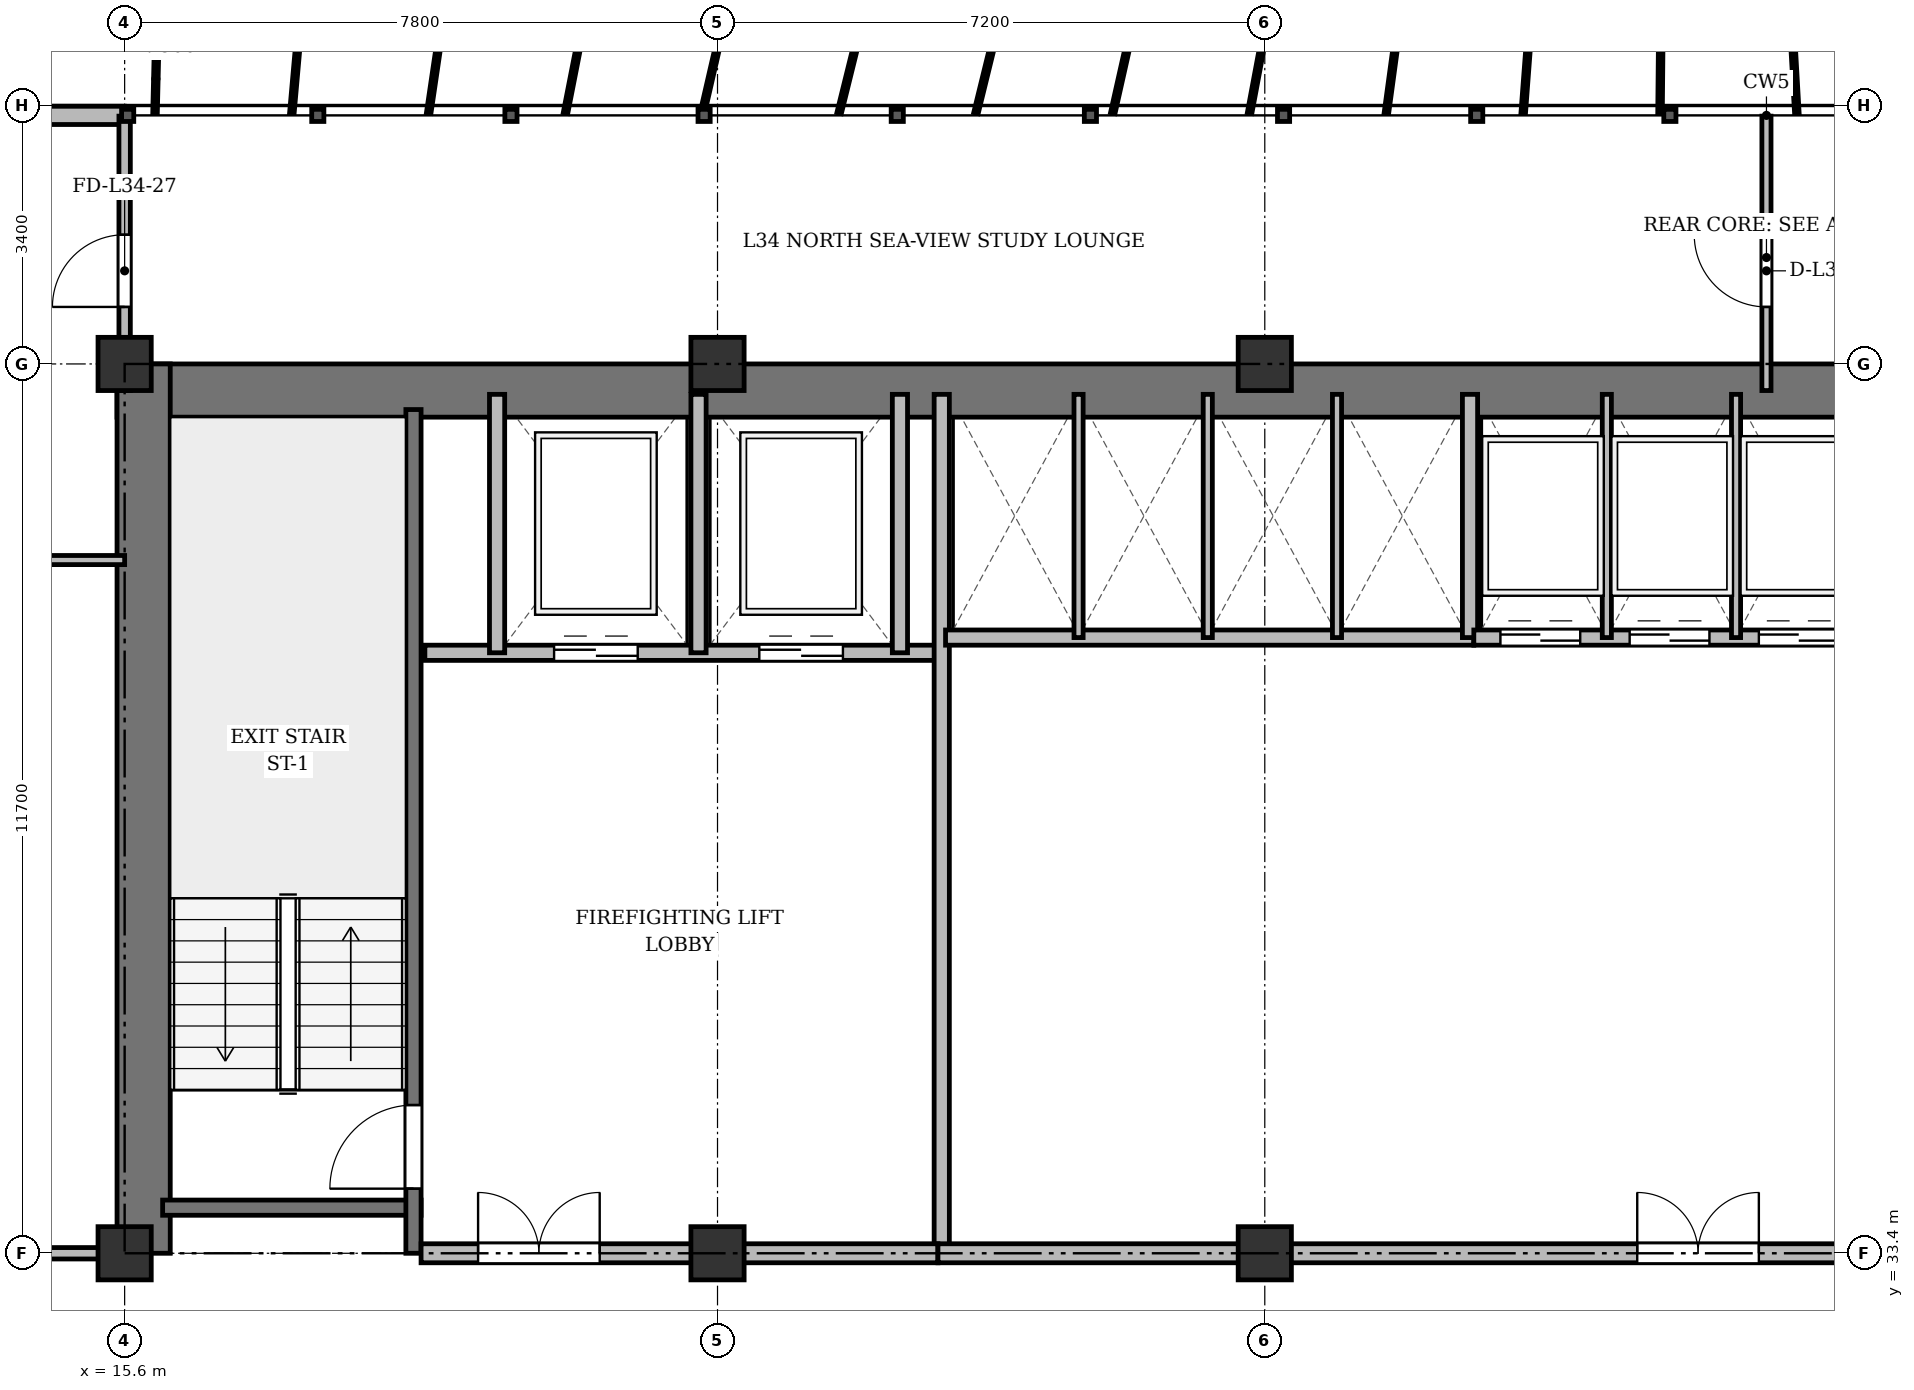
"""IFC4 building model, lengths in metres.
Left out: names, types, materials, properties, quantities, classifications, styles, units other than length and angle.
Written with IfcOpenShell. Run it as: python <this file> out.ifc"""

import sys

from ifc_helpers import new_model, si_unit, direction, frame, frame_2d, origin, origin_2d, place, context, subcontext, project, spatial, rectangle, extrude, source, transform, mapped, element, fill, save


model = new_model("IFC4")
c1 = context("Model", 3, precision=1e-05, world=origin(), true_north=direction((0.0, 1.0)))
c2 = subcontext(c1, "Body", "Model", "MODEL_VIEW")
j1 = project(units=[si_unit("LENGTHUNIT", "METRE"), si_unit("PLANEANGLEUNIT", "RADIAN")], contexts=[c1])
p1 = place(None, origin())
s1 = spatial("IfcSite", under=j1, at=p1, CompositionType="ELEMENT")
p2 = place(p1, origin())
s2 = spatial("IfcBuilding", under=s1, at=p2, CompositionType="ELEMENT")
p3 = place(p2, frame((0.0, 0.0, 132.1)))
s3 = spatial("IfcBuildingStorey", under=s2, at=p3, CompositionType="ELEMENT", Elevation=132.1)
m1 = source(origin(), c2, "Body", "SweptSolid", [
    extrude(rectangle(XDim=0.7, YDim=0.7, at=origin_2d()), origin(), (0.0, 0.0, 1.0), 3.6),
])
for number, where, z_axis, x_axis in (
    (1, (15.6, 33.4, 0.0), (0.0, 0.0, 1.0), (1.0, 0.0, 0.0)),
    (2, (15.6, 45.1, 0.0), (0.0, 0.0, 1.0), (1.0, 0.0, 0.0)),
    (3, (23.4, 33.4, 0.0), (0.0, 0.0, 1.0), (1.0, 0.0, 0.0)),
    (4, (23.4, 45.1, 0.0), (0.0, 0.0, 1.0), (1.0, 0.0, 0.0)),
    (5, (30.6, 33.4, 0.0), (0.0, 0.0, 1.0), (1.0, 0.0, 0.0)),
    (6, (30.6, 45.1, 0.0), (0.0, 0.0, 1.0), (1.0, 0.0, 0.0)),
):
    element("IfcColumn", number, at=place(p3, frame(where, z_axis=z_axis, x_axis=x_axis)), inside=s3, PredefinedType="COLUMN", context=c2, shape_type="MappedRepresentation", body=[
        mapped(m1, transform((0.0, 0.0, 0.0), x_axis=(1.0, 0.0, 0.0), y_axis=(0.0, 1.0, 0.0), z_axis=(0.0, 0.0, 1.0), scale=1.0)),
    ])
p4 = place(p3, frame((10.9, 48.37, 0.0), z_axis=(0.0, 0.0, 1.0), x_axis=(1.0, 0.0, 0.0)))
e7 = element("IfcWall", 7, at=p4, inside=s3, PredefinedType="SOLIDWALL", context=c2, shape_type="SweptSolid", body=[
    extrude(rectangle(XDim=4.7, YDim=0.24, at=frame_2d((2.35, 0.0))), origin(), (0.0, 0.0, 1.0), 3.35),
])
p5 = place(p4, frame((2.132, 0.0, 0.9)))
e8 = element("IfcOpeningElement", 8, at=p5, cuts=e7, PredefinedType="OPENING", context=c2, shape_type="SweptSolid", body=[
    extrude(rectangle(XDim=1.2, YDim=1.65, at=frame_2d((0.6, 0.825))), frame((0.0, 0.13, 0.0), z_axis=(0.0, -1.0, 0.0), x_axis=(1.0, 0.0, 0.0)), (0.0, 0.0, 1.0), 0.26),
])
p6 = place(p3, frame((15.5, 44.75, 0.0), z_axis=(0.0, 0.0, 1.0), x_axis=(1.0, 0.0, 0.0)))
e9 = element("IfcWall", 9, at=p6, inside=s3, PredefinedType="SHEAR", context=c2, shape_type="SweptSolid", body=[
    extrude(rectangle(XDim=43.4, YDim=0.7, at=frame_2d((21.7, 0.0))), origin(), (0.0, 0.0, 1.0), 3.35),
])
p7 = place(p3, frame((15.85, 33.4, 0.0), z_axis=(0.0, 0.0, 1.0), x_axis=(0.0, 1.0, 0.0)))
e10 = element("IfcWall", 10, at=p7, inside=s3, PredefinedType="SHEAR", context=c2, shape_type="SweptSolid", body=[
    extrude(rectangle(XDim=11.7, YDim=0.7, at=frame_2d((5.85, 0.0))), origin(), (0.0, 0.0, 1.0), 3.35),
])
p8 = place(p3, frame((16.1, 34.0, 0.0), z_axis=(0.0, 0.0, 1.0), x_axis=(1.0, 0.0, 0.0)))
e11 = element("IfcWall", 11, at=p8, inside=s3, PredefinedType="SHEAR", context=c2, shape_type="SweptSolid", body=[
    extrude(rectangle(XDim=3.4, YDim=0.2, at=frame_2d((1.7, 0.0))), origin(), (0.0, 0.0, 1.0), 3.35),
])
p9 = place(p3, frame((19.4, 33.4, 0.0), z_axis=(0.0, 0.0, 1.0), x_axis=(0.0, 1.0, 0.0)))
e12 = element("IfcWall", 12, at=p9, inside=s3, PredefinedType="SHEAR", context=c2, shape_type="SweptSolid", body=[
    extrude(rectangle(XDim=11.1, YDim=0.2, at=frame_2d((5.55, 0.0))), origin(), (0.0, 0.0, 1.0), 3.35),
])
p10 = place(p9, frame((0.85, 0.0, 0.0)))
e13 = element("IfcOpeningElement", 13, at=p10, cuts=e12, PredefinedType="OPENING", context=c2, shape_type="SweptSolid", body=[
    extrude(rectangle(XDim=1.1, YDim=2.15, at=frame_2d((0.55, 1.075))), frame((0.0, 0.11, 0.0), z_axis=(0.0, -1.0, 0.0), x_axis=(1.0, 0.0, 0.0)), (0.0, 0.0, 1.0), 0.22),
])
p11 = place(p3, frame((19.55, 41.3, 0.0), z_axis=(0.0, 0.0, 1.0), x_axis=(1.0, 0.0, 0.0)))
e14 = element("IfcWall", 14, at=p11, inside=s3, PredefinedType="SOLIDWALL", context=c2, shape_type="SweptSolid", body=[
    extrude(rectangle(XDim=6.75, YDim=0.2, at=frame_2d((3.375, 0.0))), origin(), (0.0, 0.0, 1.0), 3.35),
])
p12 = place(p11, frame((1.7, 0.0, 0.0)))
e15 = element("IfcOpeningElement", 15, at=p12, cuts=e14, PredefinedType="OPENING", context=c2, shape_type="SweptSolid", body=[
    extrude(rectangle(XDim=1.1, YDim=2.15, at=frame_2d((0.55, 1.075))), frame((0.0, 0.11, 0.0), z_axis=(0.0, -1.0, 0.0), x_axis=(1.0, 0.0, 0.0)), (0.0, 0.0, 1.0), 0.22),
])
p13 = place(p11, frame((4.4, 0.0, 0.0)))
e16 = element("IfcOpeningElement", 16, at=p13, cuts=e14, PredefinedType="OPENING", context=c2, shape_type="SweptSolid", body=[
    extrude(rectangle(XDim=1.1, YDim=2.15, at=frame_2d((0.55, 1.075))), frame((0.0, 0.11, 0.0), z_axis=(0.0, -1.0, 0.0), x_axis=(1.0, 0.0, 0.0)), (0.0, 0.0, 1.0), 0.22),
])
for number, where, z_axis, x_axis in (
    (17, (20.5, 41.3, 0.0), (0.0, 0.0, 1.0), (0.0, 1.0, 0.0)),
    (18, (23.15, 41.3, 0.0), (0.0, 0.0, 1.0), (0.0, 1.0, 0.0)),
    (19, (25.8, 41.3, 0.0), (0.0, 0.0, 1.0), (0.0, 1.0, 0.0)),
):
    element("IfcWall", number, at=place(p3, frame(where, z_axis=z_axis, x_axis=x_axis)), inside=s3, PredefinedType="SOLIDWALL", context=c2, shape_type="SweptSolid", body=[
        extrude(rectangle(XDim=3.4, YDim=0.2, at=frame_2d((1.7, 0.0))), origin(), (0.0, 0.0, 1.0), 3.35),
    ])
p14 = place(p3, frame((26.35, 33.4, 0.0), z_axis=(0.0, 0.0, 1.0), x_axis=(0.0, 1.0, 0.0)))
e20 = element("IfcWall", 20, at=p14, inside=s3, PredefinedType="SOLIDWALL", context=c2, shape_type="SweptSolid", body=[
    extrude(rectangle(XDim=11.3, YDim=0.2, at=frame_2d((5.65, 0.0))), origin(), (0.0, 0.0, 1.0), 2.75),
])
p15 = place(p3, frame((19.5, 33.4, 0.0), z_axis=(0.0, 0.0, 1.0), x_axis=(1.0, 0.0, 0.0)))
e21 = element("IfcWall", 21, at=p15, inside=s3, PredefinedType="PARTITIONING", context=c2, shape_type="SweptSolid", body=[
    extrude(rectangle(XDim=6.8, YDim=0.25, at=frame_2d((3.4, 0.0))), origin(), (0.0, 0.0, 1.0), 2.75),
])
p16 = place(p15, frame((0.75, 0.0, 0.0)))
e22 = element("IfcOpeningElement", 22, at=p16, cuts=e21, PredefinedType="OPENING", context=c2, shape_type="SweptSolid", body=[
    extrude(rectangle(XDim=1.6, YDim=2.2, at=frame_2d((0.8, 1.1))), frame((0.0, 0.135, 0.0), z_axis=(0.0, -1.0, 0.0), x_axis=(1.0, 0.0, 0.0)), (0.0, 0.0, 1.0), 0.27),
])
p17 = place(p3, frame((26.4, 41.5, 0.0), z_axis=(0.0, 0.0, 1.0), x_axis=(1.0, 0.0, 0.0)))
e23 = element("IfcWall", 23, at=p17, inside=s3, PredefinedType="SOLIDWALL", context=c2, shape_type="SweptSolid", body=[
    extrude(rectangle(XDim=6.95, YDim=0.2, at=frame_2d((3.475, 0.0))), origin(), (0.0, 0.0, 1.0), 2.85),
])
p18 = place(p3, frame((33.3, 41.5, 0.0), z_axis=(0.0, 0.0, 1.0), x_axis=(0.0, 1.0, 0.0)))
e24 = element("IfcWall", 24, at=p18, inside=s3, PredefinedType="SOLIDWALL", context=c2, shape_type="SweptSolid", body=[
    extrude(rectangle(XDim=3.2, YDim=0.2, at=frame_2d((1.6, 0.0))), origin(), (0.0, 0.0, 1.0), 3.35),
])
for number, where, z_axis, x_axis in (
    (25, (28.15, 41.5, 0.0), (0.0, 0.0, 1.0), (0.0, 1.0, 0.0)),
    (26, (29.85, 41.5, 0.0), (0.0, 0.0, 1.0), (0.0, 1.0, 0.0)),
    (27, (31.55, 41.5, 0.0), (0.0, 0.0, 1.0), (0.0, 1.0, 0.0)),
):
    element("IfcWall", number, at=place(p3, frame(where, z_axis=z_axis, x_axis=x_axis)), inside=s3, PredefinedType="PARTITIONING", context=c2, shape_type="SweptSolid", body=[
        extrude(rectangle(XDim=3.2, YDim=0.12, at=frame_2d((1.6, 0.0))), origin(), (0.0, 0.0, 1.0), 3.35),
    ])
p19 = place(p3, frame((33.35, 41.5, 0.0), z_axis=(0.0, 0.0, 1.0), x_axis=(1.0, 0.0, 0.0)))
e28 = element("IfcWall", 28, at=p19, inside=s3, PredefinedType="SOLIDWALL", context=c2, shape_type="SweptSolid", body=[
    extrude(rectangle(XDim=6.9, YDim=0.2, at=frame_2d((3.45, 0.0))), origin(), (0.0, 0.0, 1.0), 3.35),
])
p20 = place(p19, frame((0.35, 0.0, 0.0)))
e29 = element("IfcOpeningElement", 29, at=p20, cuts=e28, PredefinedType="OPENING", context=c2, shape_type="SweptSolid", body=[
    extrude(rectangle(XDim=1.05, YDim=2.15, at=frame_2d((0.525, 1.075))), frame((0.0, 0.11, 0.0), z_axis=(0.0, -1.0, 0.0), x_axis=(1.0, 0.0, 0.0)), (0.0, 0.0, 1.0), 0.22),
])
p21 = place(p19, frame((2.05, 0.0, 0.0)))
e30 = element("IfcOpeningElement", 30, at=p21, cuts=e28, PredefinedType="OPENING", context=c2, shape_type="SweptSolid", body=[
    extrude(rectangle(XDim=1.05, YDim=2.15, at=frame_2d((0.525, 1.075))), frame((0.0, 0.11, 0.0), z_axis=(0.0, -1.0, 0.0), x_axis=(1.0, 0.0, 0.0)), (0.0, 0.0, 1.0), 0.22),
])
p22 = place(p19, frame((3.75, 0.0, 0.0)))
e31 = element("IfcOpeningElement", 31, at=p22, cuts=e28, PredefinedType="OPENING", context=c2, shape_type="SweptSolid", body=[
    extrude(rectangle(XDim=1.05, YDim=2.15, at=frame_2d((0.525, 1.075))), frame((0.0, 0.11, 0.0), z_axis=(0.0, -1.0, 0.0), x_axis=(1.0, 0.0, 0.0)), (0.0, 0.0, 1.0), 0.22),
])
p23 = place(p19, frame((5.45, 0.0, 0.0)))
e32 = element("IfcOpeningElement", 32, at=p23, cuts=e28, PredefinedType="OPENING", context=c2, shape_type="SweptSolid", body=[
    extrude(rectangle(XDim=1.05, YDim=2.15, at=frame_2d((0.525, 1.075))), frame((0.0, 0.11, 0.0), z_axis=(0.0, -1.0, 0.0), x_axis=(1.0, 0.0, 0.0)), (0.0, 0.0, 1.0), 0.22),
])
for number, where, z_axis, x_axis in (
    (33, (35.1, 41.5, 0.0), (0.0, 0.0, 1.0), (0.0, 1.0, 0.0)),
    (34, (36.8, 41.5, 0.0), (0.0, 0.0, 1.0), (0.0, 1.0, 0.0)),
):
    element("IfcWall", number, at=place(p3, frame(where, z_axis=z_axis, x_axis=x_axis)), inside=s3, PredefinedType="PARTITIONING", context=c2, shape_type="SweptSolid", body=[
        extrude(rectangle(XDim=3.2, YDim=0.12, at=frame_2d((1.6, 0.0))), origin(), (0.0, 0.0, 1.0), 3.35),
    ])
p24 = place(p3, frame((26.3, 33.4, 0.0), z_axis=(0.0, 0.0, 1.0), x_axis=(1.0, 0.0, 0.0)))
e35 = element("IfcWall", 35, at=p24, inside=s3, PredefinedType="PARTITIONING", context=c2, shape_type="SweptSolid", body=[
    extrude(rectangle(XDim=20.85, YDim=0.25, at=frame_2d((10.425, 0.0))), origin(), (0.0, 0.0, 1.0), 2.75),
])
p25 = place(p24, frame((9.2, 0.0, 0.0)))
e36 = element("IfcOpeningElement", 36, at=p25, cuts=e35, PredefinedType="OPENING", context=c2, shape_type="SweptSolid", body=[
    extrude(rectangle(XDim=1.6, YDim=2.2, at=frame_2d((0.8, 1.1))), frame((0.0, 0.135, 0.0), z_axis=(0.0, -1.0, 0.0), x_axis=(1.0, 0.0, 0.0)), (0.0, 0.0, 1.0), 0.27),
])
p26 = place(p3, frame((11.825, 42.52, 0.0), z_axis=(0.0, 0.0, 1.0), x_axis=(1.0, 0.0, 0.0)))
e37 = element("IfcWall", 37, at=p26, inside=s3, PredefinedType="PARTITIONING", context=c2, shape_type="SweptSolid", body=[
    extrude(rectangle(XDim=3.775, YDim=0.12, at=frame_2d((1.888, 0.0))), origin(), (0.0, 0.0, 1.0), 2.85),
])
p27 = place(p26, frame((1.319, 0.0, 0.0)))
e38 = element("IfcOpeningElement", 38, at=p27, cuts=e37, PredefinedType="OPENING", context=c2, shape_type="SweptSolid", body=[
    extrude(rectangle(XDim=0.95, YDim=2.15, at=frame_2d((0.475, 1.075))), frame((0.0, 0.07, 0.0), z_axis=(0.0, -1.0, 0.0), x_axis=(1.0, 0.0, 0.0)), (0.0, 0.0, 1.0), 0.14),
])
p28 = place(p3, frame((8.05, 33.4, 0.0), z_axis=(0.0, 0.0, 1.0), x_axis=(1.0, 0.0, 0.0)))
e39 = element("IfcWall", 39, at=p28, inside=s3, PredefinedType="PARTITIONING", context=c2, shape_type="SweptSolid", body=[
    extrude(rectangle(XDim=7.55, YDim=0.15, at=frame_2d((3.775, 0.0))), origin(), (0.0, 0.0, 1.0), 2.75),
])
p29 = place(p28, frame((4.375, 0.0, 0.0)))
e40 = element("IfcOpeningElement", 40, at=p29, cuts=e39, PredefinedType="OPENING", context=c2, shape_type="SweptSolid", body=[
    extrude(rectangle(XDim=0.95, YDim=2.15, at=frame_2d((0.475, 1.075))), frame((0.0, 0.085, 0.0), z_axis=(0.0, -1.0, 0.0), x_axis=(1.0, 0.0, 0.0)), (0.0, 0.0, 1.0), 0.17),
])
p30 = place(p3, frame((37.2, 44.75, 0.0), z_axis=(0.0, 0.0, 1.0), x_axis=(0.0, 1.0, 0.0)))
e41 = element("IfcWall", 41, at=p30, inside=s3, PredefinedType="PARTITIONING", context=c2, shape_type="SweptSolid", body=[
    extrude(rectangle(XDim=3.61, YDim=0.12, at=frame_2d((1.805, 0.0))), origin(), (0.0, 0.0, 1.0), 2.75),
])
p31 = place(p30, frame((1.1, 0.0, 0.0)))
e42 = element("IfcOpeningElement", 42, at=p31, cuts=e41, PredefinedType="OPENING", context=c2, shape_type="SweptSolid", body=[
    extrude(rectangle(XDim=0.95, YDim=2.15, at=frame_2d((0.475, 1.075))), frame((0.0, 0.07, 0.0), z_axis=(0.0, -1.0, 0.0), x_axis=(1.0, 0.0, 0.0)), (0.0, 0.0, 1.0), 0.14),
])
p32 = place(p3, frame((15.6, 44.75, 0.0), z_axis=(0.0, 0.0, 1.0), x_axis=(0.0, 1.0, 0.0)))
e43 = element("IfcWall", 43, at=p32, inside=s3, PredefinedType="PARTITIONING", context=c2, shape_type="SweptSolid", body=[
    extrude(rectangle(XDim=3.61, YDim=0.15, at=frame_2d((1.805, 0.0))), origin(), (0.0, 0.0, 1.0), 2.85),
])
p33 = place(p32, frame((1.1, 0.0, 0.0)))
e44 = element("IfcOpeningElement", 44, at=p33, cuts=e43, PredefinedType="OPENING", context=c2, shape_type="SweptSolid", body=[
    extrude(rectangle(XDim=0.95, YDim=2.15, at=frame_2d((0.475, 1.075))), frame((0.0, 0.085, 0.0), z_axis=(0.0, -1.0, 0.0), x_axis=(1.0, 0.0, 0.0)), (0.0, 0.0, 1.0), 0.17),
])
m2 = source(origin(), c2, "Body", "SweptSolid", [
    extrude(rectangle(XDim=1.1, YDim=2.15, at=frame_2d((0.55, 1.075))), frame((0.0, 0.025, 0.0), z_axis=(0.0, -1.0, 0.0), x_axis=(1.0, 0.0, 0.0)), (0.0, 0.0, 1.0), 0.05),
])
p34 = place(p10, origin())
e45 = element("IfcDoor", 45, at=p34, inside=s3, OperationType="SINGLE_SWING_LEFT", PredefinedType="DOOR", context=c2, shape_type="MappedRepresentation", body=[
    mapped(m2, transform((0.0, 0.0, 0.0), x_axis=(1.0, 0.0, 0.0), y_axis=(0.0, 1.0, 0.0), z_axis=(0.0, 0.0, 1.0), scale=1.0)),
])
fill(e13, e45)
p35 = place(p12, origin())
e46 = element("IfcDoor", 46, at=p35, inside=s3, OperationType="DOUBLE_DOOR_SLIDING", PredefinedType="DOOR", context=c2, shape_type="MappedRepresentation", body=[
    mapped(m2, transform((0.0, 0.0, 0.0), x_axis=(1.0, 0.0, 0.0), y_axis=(0.0, 1.0, 0.0), z_axis=(0.0, 0.0, 1.0), scale=1.0)),
])
fill(e15, e46)
p36 = place(p13, origin())
e47 = element("IfcDoor", 47, at=p36, inside=s3, OperationType="DOUBLE_DOOR_SLIDING", PredefinedType="DOOR", context=c2, shape_type="MappedRepresentation", body=[
    mapped(m2, transform((0.0, 0.0, 0.0), x_axis=(1.0, 0.0, 0.0), y_axis=(0.0, 1.0, 0.0), z_axis=(0.0, 0.0, 1.0), scale=1.0)),
])
fill(e16, e47)
m3 = source(origin(), c2, "Body", "SweptSolid", [
    extrude(rectangle(XDim=1.6, YDim=2.2, at=frame_2d((0.8, 1.1))), frame((0.0, 0.025, 0.0), z_axis=(0.0, -1.0, 0.0), x_axis=(1.0, 0.0, 0.0)), (0.0, 0.0, 1.0), 0.05),
])
p37 = place(p16, origin())
e48 = element("IfcDoor", 48, at=p37, inside=s3, OperationType="DOUBLE_DOOR_SINGLE_SWING", PredefinedType="DOOR", context=c2, shape_type="MappedRepresentation", body=[
    mapped(m3, transform((0.0, 0.0, 0.0), x_axis=(1.0, 0.0, 0.0), y_axis=(0.0, 1.0, 0.0), z_axis=(0.0, 0.0, 1.0), scale=1.0)),
])
fill(e22, e48)
m4 = source(origin(), c2, "Body", "SweptSolid", [
    extrude(rectangle(XDim=1.05, YDim=2.15, at=frame_2d((0.525, 1.075))), frame((0.0, 0.025, 0.0), z_axis=(0.0, -1.0, 0.0), x_axis=(1.0, 0.0, 0.0)), (0.0, 0.0, 1.0), 0.05),
])
p38 = place(p20, origin())
e49 = element("IfcDoor", 49, at=p38, inside=s3, OperationType="DOUBLE_DOOR_SLIDING", PredefinedType="DOOR", context=c2, shape_type="MappedRepresentation", body=[
    mapped(m4, transform((0.0, 0.0, 0.0), x_axis=(1.0, 0.0, 0.0), y_axis=(0.0, 1.0, 0.0), z_axis=(0.0, 0.0, 1.0), scale=1.0)),
])
fill(e29, e49)
p39 = place(p21, origin())
e50 = element("IfcDoor", 50, at=p39, inside=s3, OperationType="DOUBLE_DOOR_SLIDING", PredefinedType="DOOR", context=c2, shape_type="MappedRepresentation", body=[
    mapped(m4, transform((0.0, 0.0, 0.0), x_axis=(1.0, 0.0, 0.0), y_axis=(0.0, 1.0, 0.0), z_axis=(0.0, 0.0, 1.0), scale=1.0)),
])
fill(e30, e50)
p40 = place(p22, origin())
e51 = element("IfcDoor", 51, at=p40, inside=s3, OperationType="DOUBLE_DOOR_SLIDING", PredefinedType="DOOR", context=c2, shape_type="MappedRepresentation", body=[
    mapped(m4, transform((0.0, 0.0, 0.0), x_axis=(1.0, 0.0, 0.0), y_axis=(0.0, 1.0, 0.0), z_axis=(0.0, 0.0, 1.0), scale=1.0)),
])
fill(e31, e51)
p41 = place(p25, origin())
e52 = element("IfcDoor", 52, at=p41, inside=s3, OperationType="DOUBLE_DOOR_SINGLE_SWING", PredefinedType="DOOR", context=c2, shape_type="MappedRepresentation", body=[
    mapped(m3, transform((0.0, 0.0, 0.0), x_axis=(1.0, 0.0, 0.0), y_axis=(0.0, 1.0, 0.0), z_axis=(0.0, 0.0, 1.0), scale=1.0)),
])
fill(e36, e52)
m5 = source(origin(), c2, "Body", "SweptSolid", [
    extrude(rectangle(XDim=0.95, YDim=2.15, at=frame_2d((0.475, 1.075))), frame((0.0, 0.025, 0.0), z_axis=(0.0, -1.0, 0.0), x_axis=(1.0, 0.0, 0.0)), (0.0, 0.0, 1.0), 0.05),
])
p42 = place(p31, origin())
e53 = element("IfcDoor", 53, at=p42, inside=s3, OperationType="SINGLE_SWING_RIGHT", PredefinedType="DOOR", context=c2, shape_type="MappedRepresentation", body=[
    mapped(m5, transform((0.0, 0.0, 0.0), x_axis=(1.0, 0.0, 0.0), y_axis=(0.0, 1.0, 0.0), z_axis=(0.0, 0.0, 1.0), scale=1.0)),
])
fill(e42, e53)
p43 = place(p33, origin())
e54 = element("IfcDoor", 54, at=p43, inside=s3, OperationType="SINGLE_SWING_LEFT", PredefinedType="DOOR", context=c2, shape_type="MappedRepresentation", body=[
    mapped(m5, transform((0.0, 0.0, 0.0), x_axis=(1.0, 0.0, 0.0), y_axis=(0.0, 1.0, 0.0), z_axis=(0.0, 0.0, 1.0), scale=1.0)),
])
fill(e44, e54)
save(model, sys.argv[1])
